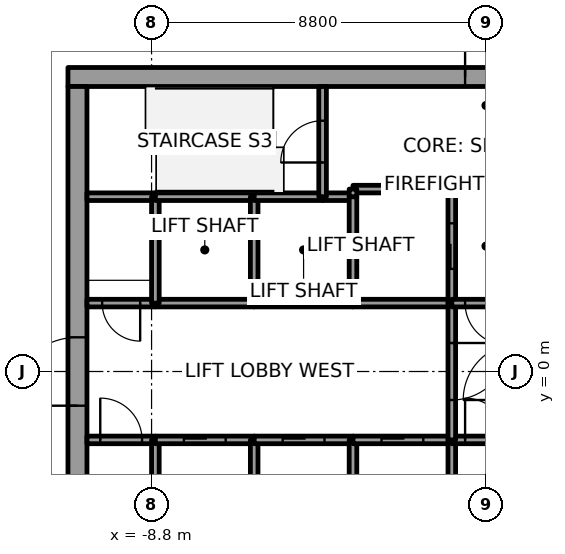
"""IFC4 building model, lengths in metres.
Left out: names, types, materials, properties, quantities, classifications, styles, units other than length and angle.
Written with IfcOpenShell. Run it as: python <this file> out.ifc"""

import sys

from ifc_helpers import new_model, si_unit, direction, frame, frame_2d, origin, place, context, subcontext, project, spatial, rectangle, extrude, element, fill, save


model = new_model("IFC4")
c1 = context("Model", 3, precision=1e-05, world=origin(), true_north=direction((0.0, 1.0)))
c2 = subcontext(c1, "Body", "Model", "MODEL_VIEW")
j1 = project(units=[si_unit("LENGTHUNIT", "METRE"), si_unit("PLANEANGLEUNIT", "RADIAN")], contexts=[c1])
p1 = place(None, origin())
s1 = spatial("IfcSite", under=j1, at=p1, CompositionType="ELEMENT")
p2 = place(p1, origin())
s2 = spatial("IfcBuilding", under=s1, at=p2, CompositionType="ELEMENT")
p3 = place(p2, frame((0.0, 0.0, 129.8)))
s3 = spatial("IfcBuildingStorey", under=s2, at=p3, CompositionType="ELEMENT", Elevation=129.8)
p4 = place(p3, frame((-11.0, 7.75, 0.0), z_axis=(0.0, 0.0, 1.0), x_axis=(1.0, 0.0, 0.0)))
e1 = element("IfcWall", 1, at=p4, inside=s3, PredefinedType="SHEAR", context=c2, shape_type="SweptSolid", body=[
    extrude(rectangle(XDim=22.0, YDim=0.5, at=frame_2d((11.0, 0.0))), origin(), (0.0, 0.0, 1.0), 4.0),
])
p5 = place(p4, frame((10.45, 0.0, 0.0)))
e2 = element("IfcOpeningElement", 2, at=p5, cuts=e1, PredefinedType="OPENING", context=c2, shape_type="SweptSolid", body=[
    extrude(rectangle(XDim=1.1, YDim=2.1, at=frame_2d((0.55, 1.05))), frame((0.0, 0.25, 0.0), z_axis=(0.0, -1.0, 0.0), x_axis=(1.0, 0.0, 0.0)), (0.0, 0.0, 1.0), 0.5),
])
p6 = place(p3, frame((-10.75, -7.5, 0.0), z_axis=(0.0, 0.0, 1.0), x_axis=(0.0, 1.0, 0.0)))
e3 = element("IfcWall", 3, at=p6, inside=s3, PredefinedType="SHEAR", context=c2, shape_type="SweptSolid", body=[
    extrude(rectangle(XDim=15.0, YDim=0.5, at=frame_2d((7.5, 0.0))), origin(), (0.0, 0.0, 1.0), 4.0),
])
p7 = place(p6, frame((6.6, 0.0, 0.0)))
e4 = element("IfcOpeningElement", 4, at=p7, cuts=e3, PredefinedType="OPENING", context=c2, shape_type="SweptSolid", body=[
    extrude(rectangle(XDim=1.8, YDim=2.1, at=frame_2d((0.9, 1.05))), frame((0.0, 0.25, 0.0), z_axis=(0.0, -1.0, 0.0), x_axis=(1.0, 0.0, 0.0)), (0.0, 0.0, 1.0), 0.5),
])
p8 = place(p3, frame((-10.5, -1.8, 0.0), z_axis=(0.0, 0.0, 1.0), x_axis=(1.0, 0.0, 0.0)))
e5 = element("IfcWall", 5, at=p8, inside=s3, PredefinedType="SOLIDWALL", context=c2, shape_type="SweptSolid", body=[
    extrude(rectangle(XDim=1.8, YDim=0.2, at=frame_2d((0.9, 0.0))), origin(), (0.0, 0.0, 1.0), 3.85),
])
p9 = place(p8, frame((0.35, 0.0, 0.0)))
e6 = element("IfcOpeningElement", 6, at=p9, cuts=e5, PredefinedType="OPENING", context=c2, shape_type="SweptSolid", body=[
    extrude(rectangle(XDim=1.1, YDim=2.1, at=frame_2d((0.55, 1.05))), frame((0.0, 0.1, 0.0), z_axis=(0.0, -1.0, 0.0), x_axis=(1.0, 0.0, 0.0)), (0.0, 0.0, 1.0), 0.2),
])
p10 = place(p3, frame((-8.7, 1.8, 0.0), z_axis=(0.0, 0.0, 1.0), x_axis=(-1.0, 0.0, 0.0)))
e7 = element("IfcWall", 7, at=p10, inside=s3, PredefinedType="SOLIDWALL", context=c2, shape_type="SweptSolid", body=[
    extrude(rectangle(XDim=1.8, YDim=0.2, at=frame_2d((0.9, 0.0))), origin(), (0.0, 0.0, 1.0), 3.85),
])
p11 = place(p10, frame((0.4, 0.0, 0.0)))
e8 = element("IfcOpeningElement", 8, at=p11, cuts=e7, PredefinedType="OPENING", context=c2, shape_type="SweptSolid", body=[
    extrude(rectangle(XDim=1.0, YDim=2.1, at=frame_2d((0.5, 1.05))), frame((0.0, 0.1, 0.0), z_axis=(0.0, -1.0, 0.0), x_axis=(1.0, 0.0, 0.0)), (0.0, 0.0, 1.0), 0.2),
])
p12 = place(p3, frame((-8.7, 4.6, 0.0), z_axis=(0.0, 0.0, 1.0), x_axis=(-1.0, 0.0, 0.0)))
e9 = element("IfcWall", 9, at=p12, inside=s3, PredefinedType="SOLIDWALL", context=c2, shape_type="SweptSolid", body=[
    extrude(rectangle(XDim=1.8, YDim=0.2, at=frame_2d((0.9, 0.0))), origin(), (0.0, 0.0, 1.0), 3.85),
])
p13 = place(p3, frame((-8.7, -4.6, 0.0), z_axis=(0.0, 0.0, 1.0), x_axis=(0.0, 1.0, 0.0)))
e10 = element("IfcWall", 10, at=p13, inside=s3, PredefinedType="SOLIDWALL", context=c2, shape_type="SweptSolid", body=[
    extrude(rectangle(XDim=2.8, YDim=0.2, at=frame_2d((1.4, 0.0))), origin(), (0.0, 0.0, 1.0), 3.85),
])
p14 = place(p3, frame((-8.7, -1.8, 0.0), z_axis=(0.0, 0.0, 1.0), x_axis=(1.0, 0.0, 0.0)))
e11 = element("IfcWall", 11, at=p14, inside=s3, PredefinedType="SOLIDWALL", context=c2, shape_type="SweptSolid", body=[
    extrude(rectangle(XDim=2.6, YDim=0.2, at=frame_2d((1.3, 0.0))), origin(), (0.0, 0.0, 1.0), 3.85),
])
p15 = place(p14, frame((0.75, 0.0, 0.0)))
e12 = element("IfcOpeningElement", 12, at=p15, cuts=e11, PredefinedType="OPENING", context=c2, shape_type="SweptSolid", body=[
    extrude(rectangle(XDim=1.1, YDim=2.1, at=frame_2d((0.55, 1.05))), frame((0.0, 0.1, 0.0), z_axis=(0.0, -1.0, 0.0), x_axis=(1.0, 0.0, 0.0)), (0.0, 0.0, 1.0), 0.2),
])
p16 = place(p3, frame((-6.1, 1.8, 0.0), z_axis=(0.0, 0.0, 1.0), x_axis=(-1.0, 0.0, 0.0)))
e13 = element("IfcWall", 13, at=p16, inside=s3, PredefinedType="SOLIDWALL", context=c2, shape_type="SweptSolid", body=[
    extrude(rectangle(XDim=2.6, YDim=0.2, at=frame_2d((1.3, 0.0))), origin(), (0.0, 0.0, 1.0), 3.85),
])
p17 = place(p3, frame((-8.7, 1.8, 0.0), z_axis=(0.0, 0.0, 1.0), x_axis=(0.0, 1.0, 0.0)))
e14 = element("IfcWall", 14, at=p17, inside=s3, PredefinedType="SOLIDWALL", context=c2, shape_type="SweptSolid", body=[
    extrude(rectangle(XDim=2.8, YDim=0.2, at=frame_2d((1.4, 0.0))), origin(), (0.0, 0.0, 1.0), 3.85),
])
p18 = place(p3, frame((-6.1, 4.6, 0.0), z_axis=(0.0, 0.0, 1.0), x_axis=(-1.0, 0.0, 0.0)))
e15 = element("IfcWall", 15, at=p18, inside=s3, PredefinedType="SOLIDWALL", context=c2, shape_type="SweptSolid", body=[
    extrude(rectangle(XDim=2.6, YDim=0.2, at=frame_2d((1.3, 0.0))), origin(), (0.0, 0.0, 1.0), 3.85),
])
p19 = place(p3, frame((-6.1, -4.6, 0.0), z_axis=(0.0, 0.0, 1.0), x_axis=(0.0, 1.0, 0.0)))
e16 = element("IfcWall", 16, at=p19, inside=s3, PredefinedType="SOLIDWALL", context=c2, shape_type="SweptSolid", body=[
    extrude(rectangle(XDim=2.8, YDim=0.2, at=frame_2d((1.4, 0.0))), origin(), (0.0, 0.0, 1.0), 3.85),
])
p20 = place(p3, frame((-6.1, -1.8, 0.0), z_axis=(0.0, 0.0, 1.0), x_axis=(1.0, 0.0, 0.0)))
e17 = element("IfcWall", 17, at=p20, inside=s3, PredefinedType="SOLIDWALL", context=c2, shape_type="SweptSolid", body=[
    extrude(rectangle(XDim=2.6, YDim=0.2, at=frame_2d((1.3, 0.0))), origin(), (0.0, 0.0, 1.0), 3.85),
])
p21 = place(p20, frame((0.75, 0.0, 0.0)))
e18 = element("IfcOpeningElement", 18, at=p21, cuts=e17, PredefinedType="OPENING", context=c2, shape_type="SweptSolid", body=[
    extrude(rectangle(XDim=1.1, YDim=2.1, at=frame_2d((0.55, 1.05))), frame((0.0, 0.1, 0.0), z_axis=(0.0, -1.0, 0.0), x_axis=(1.0, 0.0, 0.0)), (0.0, 0.0, 1.0), 0.2),
])
p22 = place(p3, frame((-3.5, 1.8, 0.0), z_axis=(0.0, 0.0, 1.0), x_axis=(-1.0, 0.0, 0.0)))
e19 = element("IfcWall", 19, at=p22, inside=s3, PredefinedType="SOLIDWALL", context=c2, shape_type="SweptSolid", body=[
    extrude(rectangle(XDim=2.6, YDim=0.2, at=frame_2d((1.3, 0.0))), origin(), (0.0, 0.0, 1.0), 3.85),
])
p23 = place(p3, frame((-6.1, 1.8, 0.0), z_axis=(0.0, 0.0, 1.0), x_axis=(0.0, 1.0, 0.0)))
e20 = element("IfcWall", 20, at=p23, inside=s3, PredefinedType="SOLIDWALL", context=c2, shape_type="SweptSolid", body=[
    extrude(rectangle(XDim=2.8, YDim=0.2, at=frame_2d((1.4, 0.0))), origin(), (0.0, 0.0, 1.0), 3.85),
])
p24 = place(p3, frame((-4.3, 4.6, 0.0), z_axis=(0.0, 0.0, 1.0), x_axis=(-1.0, 0.0, 0.0)))
e21 = element("IfcWall", 21, at=p24, inside=s3, PredefinedType="SOLIDWALL", context=c2, shape_type="SweptSolid", body=[
    extrude(rectangle(XDim=1.8, YDim=0.2, at=frame_2d((0.9, 0.0))), origin(), (0.0, 0.0, 1.0), 3.85),
])
p25 = place(p3, frame((-3.5, 4.6, 0.0), z_axis=(0.0, 0.0, 1.0), x_axis=(-1.0, 0.0, 0.0)))
e22 = element("IfcWall", 22, at=p25, inside=s3, PredefinedType="SOLIDWALL", context=c2, shape_type="SweptSolid", body=[
    extrude(rectangle(XDim=0.8, YDim=0.2, at=frame_2d((0.4, 0.0))), origin(), (0.0, 0.0, 1.0), 3.85),
])
p26 = place(p3, frame((-4.3, 4.6, 0.0), z_axis=(0.0, 0.0, 1.0), x_axis=(0.0, 1.0, 0.0)))
e23 = element("IfcWall", 23, at=p26, inside=s3, PredefinedType="SOLIDWALL", context=c2, shape_type="SweptSolid", body=[
    extrude(rectangle(XDim=2.9, YDim=0.2, at=frame_2d((1.45, 0.0))), origin(), (0.0, 0.0, 1.0), 3.85),
])
p27 = place(p26, frame((0.9, 0.0, 0.0)))
e24 = element("IfcOpeningElement", 24, at=p27, cuts=e23, PredefinedType="OPENING", context=c2, shape_type="SweptSolid", body=[
    extrude(rectangle(XDim=1.1, YDim=2.1, at=frame_2d((0.55, 1.05))), frame((0.0, 0.1, 0.0), z_axis=(0.0, -1.0, 0.0), x_axis=(1.0, 0.0, 0.0)), (0.0, 0.0, 1.0), 0.2),
])
p28 = place(p3, frame((-3.5, -4.6, 0.0), z_axis=(0.0, 0.0, 1.0), x_axis=(0.0, 1.0, 0.0)))
e25 = element("IfcWall", 25, at=p28, inside=s3, PredefinedType="SOLIDWALL", context=c2, shape_type="SweptSolid", body=[
    extrude(rectangle(XDim=2.8, YDim=0.2, at=frame_2d((1.4, 0.0))), origin(), (0.0, 0.0, 1.0), 3.85),
])
p29 = place(p3, frame((-3.5, -1.8, 0.0), z_axis=(0.0, 0.0, 1.0), x_axis=(1.0, 0.0, 0.0)))
e26 = element("IfcWall", 26, at=p29, inside=s3, PredefinedType="SOLIDWALL", context=c2, shape_type="SweptSolid", body=[
    extrude(rectangle(XDim=2.6, YDim=0.2, at=frame_2d((1.3, 0.0))), origin(), (0.0, 0.0, 1.0), 3.85),
])
p30 = place(p29, frame((0.75, 0.0, 0.0)))
e27 = element("IfcOpeningElement", 27, at=p30, cuts=e26, PredefinedType="OPENING", context=c2, shape_type="SweptSolid", body=[
    extrude(rectangle(XDim=1.1, YDim=2.1, at=frame_2d((0.55, 1.05))), frame((0.0, 0.1, 0.0), z_axis=(0.0, -1.0, 0.0), x_axis=(1.0, 0.0, 0.0)), (0.0, 0.0, 1.0), 0.2),
])
p31 = place(p3, frame((-0.9, 1.8, 0.0), z_axis=(0.0, 0.0, 1.0), x_axis=(-1.0, 0.0, 0.0)))
e28 = element("IfcWall", 28, at=p31, inside=s3, PredefinedType="SOLIDWALL", context=c2, shape_type="SweptSolid", body=[
    extrude(rectangle(XDim=2.6, YDim=0.2, at=frame_2d((1.3, 0.0))), origin(), (0.0, 0.0, 1.0), 3.85),
])
p32 = place(p3, frame((-3.5, 4.6, 0.0), z_axis=(0.0, 0.0, 1.0), x_axis=(0.0, -1.0, 0.0)))
e29 = element("IfcWall", 29, at=p32, inside=s3, PredefinedType="SOLIDWALL", context=c2, shape_type="SweptSolid", body=[
    extrude(rectangle(XDim=2.8, YDim=0.2, at=frame_2d((1.4, 0.0))), origin(), (0.0, 0.0, 1.0), 3.85),
])
p33 = place(p3, frame((-0.9, 1.8, 0.0), z_axis=(0.0, 0.0, 1.0), x_axis=(0.0, 1.0, 0.0)))
e30 = element("IfcWall", 30, at=p33, inside=s3, PredefinedType="SOLIDWALL", context=c2, shape_type="SweptSolid", body=[
    extrude(rectangle(XDim=3.0, YDim=0.2, at=frame_2d((1.5, 0.0))), origin(), (0.0, 0.0, 1.0), 3.85),
])
p34 = place(p33, frame((0.9, 0.0, 0.0)))
e31 = element("IfcOpeningElement", 31, at=p34, cuts=e30, PredefinedType="OPENING", context=c2, shape_type="SweptSolid", body=[
    extrude(rectangle(XDim=1.2, YDim=2.1, at=frame_2d((0.6, 1.05))), frame((0.0, 0.1, 0.0), z_axis=(0.0, -1.0, 0.0), x_axis=(1.0, 0.0, 0.0)), (0.0, 0.0, 1.0), 0.2),
])
p35 = place(p3, frame((-0.9, 4.8, 0.0), z_axis=(0.0, 0.0, 1.0), x_axis=(-1.0, 0.0, 0.0)))
e32 = element("IfcWall", 32, at=p35, inside=s3, PredefinedType="SOLIDWALL", context=c2, shape_type="SweptSolid", body=[
    extrude(rectangle(XDim=2.6, YDim=0.2, at=frame_2d((1.3, 0.0))), origin(), (0.0, 0.0, 1.0), 3.85),
])
p36 = place(p3, frame((-3.5, 4.8, 0.0), z_axis=(0.0, 0.0, 1.0), x_axis=(0.0, -1.0, 0.0)))
e33 = element("IfcWall", 33, at=p36, inside=s3, PredefinedType="SOLIDWALL", context=c2, shape_type="SweptSolid", body=[
    extrude(rectangle(XDim=0.2, YDim=0.2, at=frame_2d((0.1, 0.0))), origin(), (0.0, 0.0, 1.0), 3.85),
])
p37 = place(p3, frame((-0.9, -4.6, 0.0), z_axis=(0.0, 0.0, 1.0), x_axis=(0.0, 1.0, 0.0)))
e34 = element("IfcWall", 34, at=p37, inside=s3, PredefinedType="SOLIDWALL", context=c2, shape_type="SweptSolid", body=[
    extrude(rectangle(XDim=2.8, YDim=0.2, at=frame_2d((1.4, 0.0))), origin(), (0.0, 0.0, 1.0), 3.85),
])
p38 = place(p3, frame((-0.9, -1.8, 0.0), z_axis=(0.0, 0.0, 1.0), x_axis=(1.0, 0.0, 0.0)))
e35 = element("IfcWall", 35, at=p38, inside=s3, PredefinedType="SOLIDWALL", context=c2, shape_type="SweptSolid", body=[
    extrude(rectangle(XDim=1.8, YDim=0.2, at=frame_2d((0.9, 0.0))), origin(), (0.0, 0.0, 1.0), 3.85),
])
p39 = place(p38, frame((0.35, 0.0, 0.0)))
e36 = element("IfcOpeningElement", 36, at=p39, cuts=e35, PredefinedType="OPENING", context=c2, shape_type="SweptSolid", body=[
    extrude(rectangle(XDim=1.1, YDim=2.1, at=frame_2d((0.55, 1.05))), frame((0.0, 0.1, 0.0), z_axis=(0.0, -1.0, 0.0), x_axis=(1.0, 0.0, 0.0)), (0.0, 0.0, 1.0), 0.2),
])
p40 = place(p3, frame((-0.9, 1.8, 0.0), z_axis=(0.0, 0.0, 1.0), x_axis=(0.0, -1.0, 0.0)))
e37 = element("IfcWall", 37, at=p40, inside=s3, PredefinedType="SOLIDWALL", context=c2, shape_type="SweptSolid", body=[
    extrude(rectangle(XDim=3.6, YDim=0.2, at=frame_2d((1.8, 0.0))), origin(), (0.0, 0.0, 1.0), 3.85),
])
p41 = place(p40, frame((1.05, 0.0, 0.0)))
e38 = element("IfcOpeningElement", 38, at=p41, cuts=e37, PredefinedType="OPENING", context=c2, shape_type="SweptSolid", body=[
    extrude(rectangle(XDim=1.5, YDim=2.1, at=frame_2d((0.75, 1.05))), frame((0.0, 0.1, 0.0), z_axis=(0.0, -1.0, 0.0), x_axis=(1.0, 0.0, 0.0)), (0.0, 0.0, 1.0), 0.2),
])
p42 = place(p3, frame((0.9, 1.8, 0.0), z_axis=(0.0, 0.0, 1.0), x_axis=(-1.0, 0.0, 0.0)))
e39 = element("IfcWall", 39, at=p42, inside=s3, PredefinedType="SOLIDWALL", context=c2, shape_type="SweptSolid", body=[
    extrude(rectangle(XDim=1.8, YDim=0.2, at=frame_2d((0.9, 0.0))), origin(), (0.0, 0.0, 1.0), 3.85),
])
p43 = place(p42, frame((0.35, 0.0, 0.0)))
e40 = element("IfcOpeningElement", 40, at=p43, cuts=e39, PredefinedType="OPENING", context=c2, shape_type="SweptSolid", body=[
    extrude(rectangle(XDim=1.1, YDim=2.1, at=frame_2d((0.55, 1.05))), frame((0.0, 0.1, 0.0), z_axis=(0.0, -1.0, 0.0), x_axis=(1.0, 0.0, 0.0)), (0.0, 0.0, 1.0), 0.2),
])
p44 = place(p15, origin())
e41 = element("IfcDoor", 41, at=p44, inside=s3, OperationType="SLIDING_TO_RIGHT", PredefinedType="DOOR", context=c2, shape_type="SweptSolid", body=[
    extrude(rectangle(XDim=1.1, YDim=2.1, at=frame_2d((0.55, 1.05))), frame((0.0, 0.025, 0.0), z_axis=(0.0, -1.0, 0.0), x_axis=(1.0, 0.0, 0.0)), (0.0, 0.0, 1.0), 0.05),
])
fill(e12, e41)
p45 = place(p21, origin())
e42 = element("IfcDoor", 42, at=p45, inside=s3, OperationType="SLIDING_TO_LEFT", PredefinedType="DOOR", context=c2, shape_type="SweptSolid", body=[
    extrude(rectangle(XDim=1.1, YDim=2.1, at=frame_2d((0.55, 1.05))), frame((0.0, 0.025, 0.0), z_axis=(0.0, -1.0, 0.0), x_axis=(1.0, 0.0, 0.0)), (0.0, 0.0, 1.0), 0.05),
])
fill(e18, e42)
p46 = place(p30, origin())
e43 = element("IfcDoor", 43, at=p46, inside=s3, OperationType="SLIDING_TO_RIGHT", PredefinedType="DOOR", context=c2, shape_type="SweptSolid", body=[
    extrude(rectangle(XDim=1.1, YDim=2.1, at=frame_2d((0.55, 1.05))), frame((0.0, 0.025, 0.0), z_axis=(0.0, -1.0, 0.0), x_axis=(1.0, 0.0, 0.0)), (0.0, 0.0, 1.0), 0.05),
])
fill(e27, e43)
p47 = place(p34, origin())
e44 = element("IfcDoor", 44, at=p47, inside=s3, OperationType="SLIDING_TO_LEFT", PredefinedType="DOOR", context=c2, shape_type="SweptSolid", body=[
    extrude(rectangle(XDim=1.2, YDim=2.1, at=frame_2d((0.6, 1.05))), frame((0.0, 0.025, 0.0), z_axis=(0.0, -1.0, 0.0), x_axis=(1.0, 0.0, 0.0)), (0.0, 0.0, 1.0), 0.05),
])
fill(e31, e44)
p48 = place(p41, origin())
e45 = element("IfcDoor", 45, at=p48, inside=s3, OperationType="DOUBLE_DOOR_SINGLE_SWING", PredefinedType="DOOR", context=c2, shape_type="SweptSolid", body=[
    extrude(rectangle(XDim=1.5, YDim=2.1, at=frame_2d((0.75, 1.05))), frame((0.0, 0.025, 0.0), z_axis=(0.0, -1.0, 0.0), x_axis=(1.0, 0.0, 0.0)), (0.0, 0.0, 1.0), 0.05),
])
fill(e38, e45)
p49 = place(p9, origin())
e46 = element("IfcDoor", 46, at=p49, inside=s3, OperationType="SINGLE_SWING_LEFT", PredefinedType="DOOR", context=c2, shape_type="SweptSolid", body=[
    extrude(rectangle(XDim=1.1, YDim=2.1, at=frame_2d((0.55, 1.05))), frame((0.0, 0.025, 0.0), z_axis=(0.0, -1.0, 0.0), x_axis=(1.0, 0.0, 0.0)), (0.0, 0.0, 1.0), 0.05),
])
fill(e6, e46)
p50 = place(p43, origin())
e47 = element("IfcDoor", 47, at=p50, inside=s3, OperationType="SINGLE_SWING_LEFT", PredefinedType="DOOR", context=c2, shape_type="SweptSolid", body=[
    extrude(rectangle(XDim=1.1, YDim=2.1, at=frame_2d((0.55, 1.05))), frame((0.0, 0.025, 0.0), z_axis=(0.0, -1.0, 0.0), x_axis=(1.0, 0.0, 0.0)), (0.0, 0.0, 1.0), 0.05),
])
fill(e40, e47)
p51 = place(p39, origin())
e48 = element("IfcDoor", 48, at=p51, inside=s3, OperationType="SINGLE_SWING_RIGHT", PredefinedType="DOOR", context=c2, shape_type="SweptSolid", body=[
    extrude(rectangle(XDim=1.1, YDim=2.1, at=frame_2d((0.55, 1.05))), frame((0.0, 0.025, 0.0), z_axis=(0.0, -1.0, 0.0), x_axis=(1.0, 0.0, 0.0)), (0.0, 0.0, 1.0), 0.05),
])
fill(e36, e48)
p52 = place(p11, origin())
e49 = element("IfcDoor", 49, at=p52, inside=s3, OperationType="SINGLE_SWING_RIGHT", PredefinedType="DOOR", context=c2, shape_type="SweptSolid", body=[
    extrude(rectangle(XDim=1.0, YDim=2.1, at=frame_2d((0.5, 1.05))), frame((0.0, 0.025, 0.0), z_axis=(0.0, -1.0, 0.0), x_axis=(1.0, 0.0, 0.0)), (0.0, 0.0, 1.0), 0.05),
])
fill(e8, e49)
p53 = place(p27, origin())
e50 = element("IfcDoor", 50, at=p53, inside=s3, OperationType="SINGLE_SWING_LEFT", PredefinedType="DOOR", context=c2, shape_type="SweptSolid", body=[
    extrude(rectangle(XDim=1.1, YDim=2.1, at=frame_2d((0.55, 1.05))), frame((0.0, 0.025, 0.0), z_axis=(0.0, -1.0, 0.0), x_axis=(1.0, 0.0, 0.0)), (0.0, 0.0, 1.0), 0.05),
])
fill(e24, e50)
p54 = place(p7, origin())
e51 = element("IfcDoor", 51, at=p54, inside=s3, OperationType="DOUBLE_DOOR_SINGLE_SWING", PredefinedType="DOOR", context=c2, shape_type="SweptSolid", body=[
    extrude(rectangle(XDim=1.8, YDim=2.1, at=frame_2d((0.9, 1.05))), frame((0.0, 0.025, 0.0), z_axis=(0.0, -1.0, 0.0), x_axis=(1.0, 0.0, 0.0)), (0.0, 0.0, 1.0), 0.05),
])
fill(e4, e51)
p55 = place(p5, origin())
e52 = element("IfcDoor", 52, at=p55, inside=s3, OperationType="SINGLE_SWING_RIGHT", PredefinedType="DOOR", context=c2, shape_type="SweptSolid", body=[
    extrude(rectangle(XDim=1.1, YDim=2.1, at=frame_2d((0.55, 1.05))), frame((0.0, 0.025, 0.0), z_axis=(0.0, -1.0, 0.0), x_axis=(1.0, 0.0, 0.0)), (0.0, 0.0, 1.0), 0.05),
])
fill(e2, e52)
save(model, sys.argv[1])
